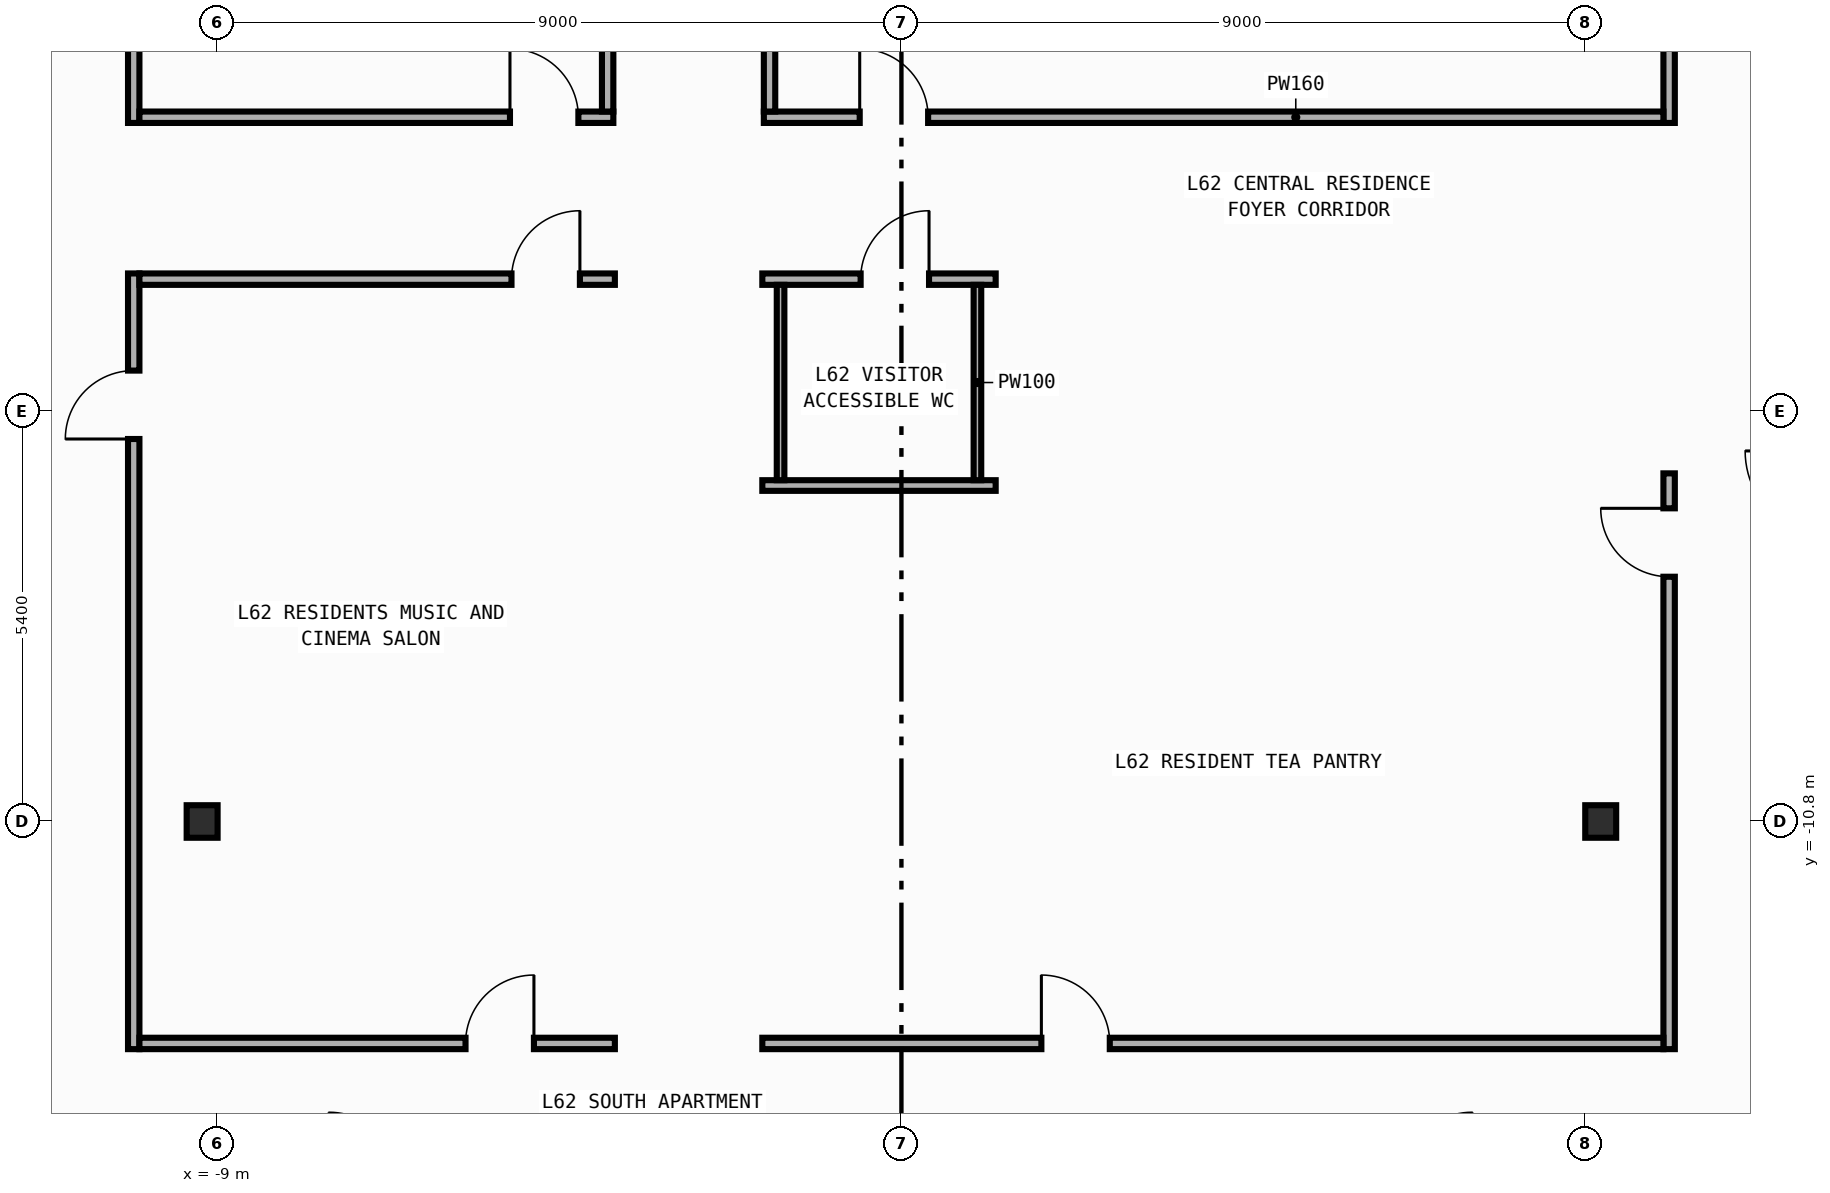
"""IFC4 building model, lengths in metres.
Left out: names, types, materials, properties, quantities, classifications, styles, units other than length and angle.
Written with IfcOpenShell. Run it as: python <this file> out.ifc"""

import sys

from ifc_helpers import new_model, si_unit, direction, frame, frame_2d, origin, origin_2d, place, context, subcontext, project, spatial, rectangle, i_section, extrude, element, fill, save


model = new_model("IFC4")
c1 = context("Model", 3, precision=1e-05, world=origin(), true_north=direction((0.0, 1.0)))
c2 = subcontext(c1, "Body", "Model", "MODEL_VIEW")
j1 = project(units=[si_unit("LENGTHUNIT", "METRE"), si_unit("PLANEANGLEUNIT", "RADIAN")], contexts=[c1])
p1 = place(None, origin())
s1 = spatial("IfcSite", under=j1, at=p1, CompositionType="ELEMENT")
p2 = place(p1, origin())
s2 = spatial("IfcBuilding", under=s1, at=p2, CompositionType="ELEMENT")
p3 = place(p2, frame((0.0, 0.0, 262.0)))
s3 = spatial("IfcBuildingStorey", under=s2, at=p3, CompositionType="ELEMENT", Elevation=262.0)
for number, where, z_axis, x_axis in (
    (1, (-9.2, -10.8, 0.0), (0.0, 0.0, 1.0), (1.0, 0.0, 0.0)),
    (2, (9.2, -10.8, 0.0), (0.0, 0.0, 1.0), (1.0, 0.0, 0.0)),
):
    element("IfcColumn", number, at=place(p3, frame(where, z_axis=z_axis, x_axis=x_axis)), inside=s3, PredefinedType="COLUMN", context=c2, shape_type="SweptSolid", body=[
        extrude(i_section(OverallWidth=0.407, OverallDepth=0.428, WebThickness=0.02, FlangeThickness=0.035, FilletRadius=0.022, at=origin_2d()), origin(), (0.0, 0.0, 1.0), 3.6),
    ])
p4 = place(p3, frame((-10.1, -1.61, 0.0), z_axis=(0.0, 0.0, 1.0), x_axis=(0.0, 1.0, 0.0)))
e3 = element("IfcWall", 3, at=p4, inside=s3, PredefinedType="PARTITIONING", context=c2, shape_type="SweptSolid", body=[
    extrude(rectangle(XDim=15.405, YDim=0.15, at=frame_2d((7.703, 0.0))), origin(), (0.0, 0.0, 1.0), 3.34),
])
p5 = place(p4, frame((6.543, 0.0, 0.0)))
e4 = element("IfcOpeningElement", 4, at=p5, cuts=e3, PredefinedType="OPENING", context=c2, shape_type="SweptSolid", body=[
    extrude(rectangle(XDim=0.9, YDim=2.15, at=frame_2d((0.45, 1.075))), frame((0.0, 0.085, 0.0), z_axis=(0.0, -1.0, 0.0), x_axis=(1.0, 0.0, 0.0)), (0.0, 0.0, 1.0), 0.17),
])
p6 = place(p3, frame((-10.1, -13.795, 0.0), z_axis=(0.0, 0.0, 1.0), x_axis=(0.0, 1.0, 0.0)))
e5 = element("IfcWall", 5, at=p6, inside=s3, PredefinedType="PARTITIONING", context=c2, shape_type="SweptSolid", body=[
    extrude(rectangle(XDim=10.205, YDim=0.15, at=frame_2d((5.103, 0.0))), origin(), (0.0, 0.0, 1.0), 3.34),
])
p7 = place(p6, frame((8.027, 0.0, 0.0)))
e6 = element("IfcOpeningElement", 6, at=p7, cuts=e5, PredefinedType="OPENING", context=c2, shape_type="SweptSolid", body=[
    extrude(rectangle(XDim=0.9, YDim=2.15, at=frame_2d((0.45, 1.075))), frame((0.0, 0.085, 0.0), z_axis=(0.0, -1.0, 0.0), x_axis=(1.0, 0.0, 0.0)), (0.0, 0.0, 1.0), 0.17),
])
p8 = place(p3, frame((10.1, -1.61, 0.0), z_axis=(0.0, 0.0, 1.0), x_axis=(0.0, 1.0, 0.0)))
e7 = element("IfcWall", 7, at=p8, inside=s3, PredefinedType="PARTITIONING", context=c2, shape_type="SweptSolid", body=[
    extrude(rectangle(XDim=15.405, YDim=0.15, at=frame_2d((7.703, 0.0))), origin(), (0.0, 0.0, 1.0), 3.34),
])
p9 = place(p8, frame((6.543, 0.0, 0.0)))
e8 = element("IfcOpeningElement", 8, at=p9, cuts=e7, PredefinedType="OPENING", context=c2, shape_type="SweptSolid", body=[
    extrude(rectangle(XDim=0.9, YDim=2.15, at=frame_2d((0.45, 1.075))), frame((0.0, 0.085, 0.0), z_axis=(0.0, -1.0, 0.0), x_axis=(1.0, 0.0, 0.0)), (0.0, 0.0, 1.0), 0.17),
])
p10 = place(p3, frame((10.1, -13.795, 0.0), z_axis=(0.0, 0.0, 1.0), x_axis=(0.0, 1.0, 0.0)))
e9 = element("IfcWall", 9, at=p10, inside=s3, PredefinedType="PARTITIONING", context=c2, shape_type="SweptSolid", body=[
    extrude(rectangle(XDim=7.575, YDim=0.15, at=frame_2d((3.788, 0.0))), origin(), (0.0, 0.0, 1.0), 3.34),
])
p11 = place(p10, frame((6.215, 0.0, 0.0)))
e10 = element("IfcOpeningElement", 10, at=p11, cuts=e9, PredefinedType="OPENING", context=c2, shape_type="SweptSolid", body=[
    extrude(rectangle(XDim=0.9, YDim=2.15, at=frame_2d((0.45, 1.075))), frame((0.0, 0.085, 0.0), z_axis=(0.0, -1.0, 0.0), x_axis=(1.0, 0.0, 0.0)), (0.0, 0.0, 1.0), 0.17),
])
p12 = place(p3, frame((-10.025, -1.535, 0.0), z_axis=(0.0, 0.0, 1.0), x_axis=(1.0, 0.0, 0.0)))
e11 = element("IfcWall", 11, at=p12, inside=s3, PredefinedType="PARTITIONING", context=c2, shape_type="SweptSolid", body=[
    extrude(rectangle(XDim=6.235, YDim=0.15, at=frame_2d((3.117, 0.0))), origin(), (0.0, 0.0, 1.0), 3.34),
])
p13 = place(p12, frame((4.875, 0.0, 0.0)))
e12 = element("IfcOpeningElement", 12, at=p13, cuts=e11, PredefinedType="OPENING", context=c2, shape_type="SweptSolid", body=[
    extrude(rectangle(XDim=0.9, YDim=2.15, at=frame_2d((0.45, 1.075))), frame((0.0, 0.085, 0.0), z_axis=(0.0, -1.0, 0.0), x_axis=(1.0, 0.0, 0.0)), (0.0, 0.0, 1.0), 0.17),
])
p14 = place(p3, frame((-10.025, -3.665, 0.0), z_axis=(0.0, 0.0, 1.0), x_axis=(1.0, 0.0, 0.0)))
e13 = element("IfcWall", 13, at=p14, inside=s3, PredefinedType="PARTITIONING", context=c2, shape_type="SweptSolid", body=[
    extrude(rectangle(XDim=6.255, YDim=0.15, at=frame_2d((3.127, 0.0))), origin(), (0.0, 0.0, 1.0), 3.34),
])
p15 = place(p14, frame((4.895, 0.0, 0.0)))
e14 = element("IfcOpeningElement", 14, at=p15, cuts=e13, PredefinedType="OPENING", context=c2, shape_type="SweptSolid", body=[
    extrude(rectangle(XDim=0.9, YDim=2.15, at=frame_2d((0.45, 1.075))), frame((0.0, 0.085, 0.0), z_axis=(0.0, -1.0, 0.0), x_axis=(1.0, 0.0, 0.0)), (0.0, 0.0, 1.0), 0.17),
])
p16 = place(p3, frame((-1.81, -1.535, 0.0), z_axis=(0.0, 0.0, 1.0), x_axis=(1.0, 0.0, 0.0)))
e15 = element("IfcWall", 15, at=p16, inside=s3, PredefinedType="PARTITIONING", context=c2, shape_type="SweptSolid", body=[
    extrude(rectangle(XDim=11.835, YDim=0.15, at=frame_2d((5.917, 0.0))), origin(), (0.0, 0.0, 1.0), 3.34),
])
p17 = place(p16, frame((1.261, 0.0, 0.0)))
e16 = element("IfcOpeningElement", 16, at=p17, cuts=e15, PredefinedType="OPENING", context=c2, shape_type="SweptSolid", body=[
    extrude(rectangle(XDim=0.9, YDim=2.15, at=frame_2d((0.45, 1.075))), frame((0.0, 0.085, 0.0), z_axis=(0.0, -1.0, 0.0), x_axis=(1.0, 0.0, 0.0)), (0.0, 0.0, 1.0), 0.17),
])
p18 = place(p3, frame((-1.83, -3.665, 0.0), z_axis=(0.0, 0.0, 1.0), x_axis=(1.0, 0.0, 0.0)))
e17 = element("IfcWall", 17, at=p18, inside=s3, PredefinedType="PARTITIONING", context=c2, shape_type="SweptSolid", body=[
    extrude(rectangle(XDim=3.07, YDim=0.15, at=frame_2d((1.535, 0.0))), origin(), (0.0, 0.0, 1.0), 3.34),
])
p19 = place(p18, frame((1.293, 0.0, 0.0)))
e18 = element("IfcOpeningElement", 18, at=p19, cuts=e17, PredefinedType="OPENING", context=c2, shape_type="SweptSolid", body=[
    extrude(rectangle(XDim=0.9, YDim=2.15, at=frame_2d((0.45, 1.075))), frame((0.0, 0.085, 0.0), z_axis=(0.0, -1.0, 0.0), x_axis=(1.0, 0.0, 0.0)), (0.0, 0.0, 1.0), 0.17),
])
p20 = place(p3, frame((-3.865, -1.46, 0.0), z_axis=(0.0, 0.0, 1.0), x_axis=(0.0, 1.0, 0.0)))
e19 = element("IfcWall", 19, at=p20, inside=s3, PredefinedType="PARTITIONING", context=c2, shape_type="SweptSolid", body=[
    extrude(rectangle(XDim=15.255, YDim=0.15, at=frame_2d((7.627, 0.0))), origin(), (0.0, 0.0, 1.0), 3.34),
])
p21 = place(p20, frame((6.476, 0.0, 0.0)))
e20 = element("IfcOpeningElement", 20, at=p21, cuts=e19, PredefinedType="OPENING", context=c2, shape_type="SweptSolid", body=[
    extrude(rectangle(XDim=0.9, YDim=2.15, at=frame_2d((0.45, 1.075))), frame((0.0, 0.085, 0.0), z_axis=(0.0, -1.0, 0.0), x_axis=(1.0, 0.0, 0.0)), (0.0, 0.0, 1.0), 0.17),
])
p22 = place(p3, frame((-1.735, -1.46, 0.0), z_axis=(0.0, 0.0, 1.0), x_axis=(0.0, 1.0, 0.0)))
e21 = element("IfcWall", 21, at=p22, inside=s3, PredefinedType="PARTITIONING", context=c2, shape_type="SweptSolid", body=[
    extrude(rectangle(XDim=15.255, YDim=0.15, at=frame_2d((7.627, 0.0))), origin(), (0.0, 0.0, 1.0), 3.34),
])
p23 = place(p22, frame((6.476, 0.0, 0.0)))
e22 = element("IfcOpeningElement", 22, at=p23, cuts=e21, PredefinedType="OPENING", context=c2, shape_type="SweptSolid", body=[
    extrude(rectangle(XDim=0.9, YDim=2.15, at=frame_2d((0.45, 1.075))), frame((0.0, 0.085, 0.0), z_axis=(0.0, -1.0, 0.0), x_axis=(1.0, 0.0, 0.0)), (0.0, 0.0, 1.0), 0.17),
])
p24 = place(p3, frame((-10.025, -13.72, 0.0), z_axis=(0.0, 0.0, 1.0), x_axis=(1.0, 0.0, 0.0)))
e23 = element("IfcWall", 23, at=p24, inside=s3, PredefinedType="PARTITIONING", context=c2, shape_type="SweptSolid", body=[
    extrude(rectangle(XDim=6.255, YDim=0.15, at=frame_2d((3.127, 0.0))), origin(), (0.0, 0.0, 1.0), 3.34),
])
p25 = place(p24, frame((4.29, 0.0, 0.0)))
e24 = element("IfcOpeningElement", 24, at=p25, cuts=e23, PredefinedType="OPENING", context=c2, shape_type="SweptSolid", body=[
    extrude(rectangle(XDim=0.9, YDim=2.15, at=frame_2d((0.45, 1.075))), frame((0.0, 0.085, 0.0), z_axis=(0.0, -1.0, 0.0), x_axis=(1.0, 0.0, 0.0)), (0.0, 0.0, 1.0), 0.17),
])
p26 = place(p3, frame((-1.83, -13.72, 0.0), z_axis=(0.0, 0.0, 1.0), x_axis=(1.0, 0.0, 0.0)))
e25 = element("IfcWall", 25, at=p26, inside=s3, PredefinedType="PARTITIONING", context=c2, shape_type="SweptSolid", body=[
    extrude(rectangle(XDim=11.855, YDim=0.15, at=frame_2d((5.927, 0.0))), origin(), (0.0, 0.0, 1.0), 3.34),
])
p27 = place(p26, frame((3.671, 0.0, 0.0)))
e26 = element("IfcOpeningElement", 26, at=p27, cuts=e25, PredefinedType="OPENING", context=c2, shape_type="SweptSolid", body=[
    extrude(rectangle(XDim=0.9, YDim=2.15, at=frame_2d((0.45, 1.075))), frame((0.0, 0.085, 0.0), z_axis=(0.0, -1.0, 0.0), x_axis=(1.0, 0.0, 0.0)), (0.0, 0.0, 1.0), 0.17),
])
p28 = place(p3, frame((-1.83, -6.38, 0.0), z_axis=(0.0, 0.0, 1.0), x_axis=(1.0, 0.0, 0.0)))
e27 = element("IfcWall", 27, at=p28, inside=s3, PredefinedType="PARTITIONING", context=c2, shape_type="SweptSolid", body=[
    extrude(rectangle(XDim=3.07, YDim=0.14, at=frame_2d((1.535, 0.0))), origin(), (0.0, 0.0, 1.0), 3.34),
])
for number, where, z_axis, x_axis in (
    (28, (1.0, -3.74, 0.0), (0.0, 0.0, 1.0), (0.0, -1.0, 0.0)),
    (29, (-1.59, -6.31, 0.0), (0.0, 0.0, 1.0), (0.0, 1.0, 0.0)),
):
    element("IfcWall", number, at=place(p3, frame(where, z_axis=z_axis, x_axis=x_axis)), inside=s3, PredefinedType="PARTITIONING", context=c2, shape_type="SweptSolid", body=[
        extrude(rectangle(XDim=2.57, YDim=0.1, at=frame_2d((1.285, 0.0))), origin(), (0.0, 0.0, 1.0), 3.34),
    ])
p29 = place(p7, origin())
e30 = element("IfcDoor", 30, at=p29, inside=s3, OperationType="SINGLE_SWING_LEFT", PredefinedType="DOOR", context=c2, shape_type="SweptSolid", body=[
    extrude(rectangle(XDim=0.9, YDim=2.15, at=frame_2d((0.45, 1.075))), frame((0.0, 0.025, 0.0), z_axis=(0.0, -1.0, 0.0), x_axis=(1.0, 0.0, 0.0)), (0.0, 0.0, 1.0), 0.05),
])
fill(e6, e30)
p30 = place(p11, origin())
e31 = element("IfcDoor", 31, at=p30, inside=s3, OperationType="SINGLE_SWING_RIGHT", PredefinedType="DOOR", context=c2, shape_type="SweptSolid", body=[
    extrude(rectangle(XDim=0.9, YDim=2.15, at=frame_2d((0.45, 1.075))), frame((0.0, 0.025, 0.0), z_axis=(0.0, -1.0, 0.0), x_axis=(1.0, 0.0, 0.0)), (0.0, 0.0, 1.0), 0.05),
])
fill(e10, e31)
p31 = place(p13, origin())
e32 = element("IfcDoor", 32, at=p31, inside=s3, OperationType="SINGLE_SWING_LEFT", PredefinedType="DOOR", context=c2, shape_type="SweptSolid", body=[
    extrude(rectangle(XDim=0.9, YDim=2.15, at=frame_2d((0.45, 1.075))), frame((0.0, 0.025, 0.0), z_axis=(0.0, -1.0, 0.0), x_axis=(1.0, 0.0, 0.0)), (0.0, 0.0, 1.0), 0.05),
])
fill(e12, e32)
p32 = place(p15, origin())
e33 = element("IfcDoor", 33, at=p32, inside=s3, OperationType="SINGLE_SWING_RIGHT", PredefinedType="DOOR", context=c2, shape_type="SweptSolid", body=[
    extrude(rectangle(XDim=0.9, YDim=2.15, at=frame_2d((0.45, 1.075))), frame((0.0, 0.025, 0.0), z_axis=(0.0, -1.0, 0.0), x_axis=(1.0, 0.0, 0.0)), (0.0, 0.0, 1.0), 0.05),
])
fill(e14, e33)
p33 = place(p17, origin())
e34 = element("IfcDoor", 34, at=p33, inside=s3, OperationType="SINGLE_SWING_LEFT", PredefinedType="DOOR", context=c2, shape_type="SweptSolid", body=[
    extrude(rectangle(XDim=0.9, YDim=2.15, at=frame_2d((0.45, 1.075))), frame((0.0, 0.025, 0.0), z_axis=(0.0, -1.0, 0.0), x_axis=(1.0, 0.0, 0.0)), (0.0, 0.0, 1.0), 0.05),
])
fill(e16, e34)
p34 = place(p19, origin())
e35 = element("IfcDoor", 35, at=p34, inside=s3, OperationType="SINGLE_SWING_RIGHT", PredefinedType="DOOR", context=c2, shape_type="SweptSolid", body=[
    extrude(rectangle(XDim=0.9, YDim=2.15, at=frame_2d((0.45, 1.075))), frame((0.0, 0.025, 0.0), z_axis=(0.0, -1.0, 0.0), x_axis=(1.0, 0.0, 0.0)), (0.0, 0.0, 1.0), 0.05),
])
fill(e18, e35)
p35 = place(p25, origin())
e36 = element("IfcDoor", 36, at=p35, inside=s3, OperationType="SINGLE_SWING_RIGHT", PredefinedType="DOOR", context=c2, shape_type="SweptSolid", body=[
    extrude(rectangle(XDim=0.9, YDim=2.15, at=frame_2d((0.45, 1.075))), frame((0.0, 0.025, 0.0), z_axis=(0.0, -1.0, 0.0), x_axis=(1.0, 0.0, 0.0)), (0.0, 0.0, 1.0), 0.05),
])
fill(e24, e36)
p36 = place(p27, origin())
e37 = element("IfcDoor", 37, at=p36, inside=s3, OperationType="SINGLE_SWING_LEFT", PredefinedType="DOOR", context=c2, shape_type="SweptSolid", body=[
    extrude(rectangle(XDim=0.9, YDim=2.15, at=frame_2d((0.45, 1.075))), frame((0.0, 0.025, 0.0), z_axis=(0.0, -1.0, 0.0), x_axis=(1.0, 0.0, 0.0)), (0.0, 0.0, 1.0), 0.05),
])
fill(e26, e37)
save(model, sys.argv[1])
